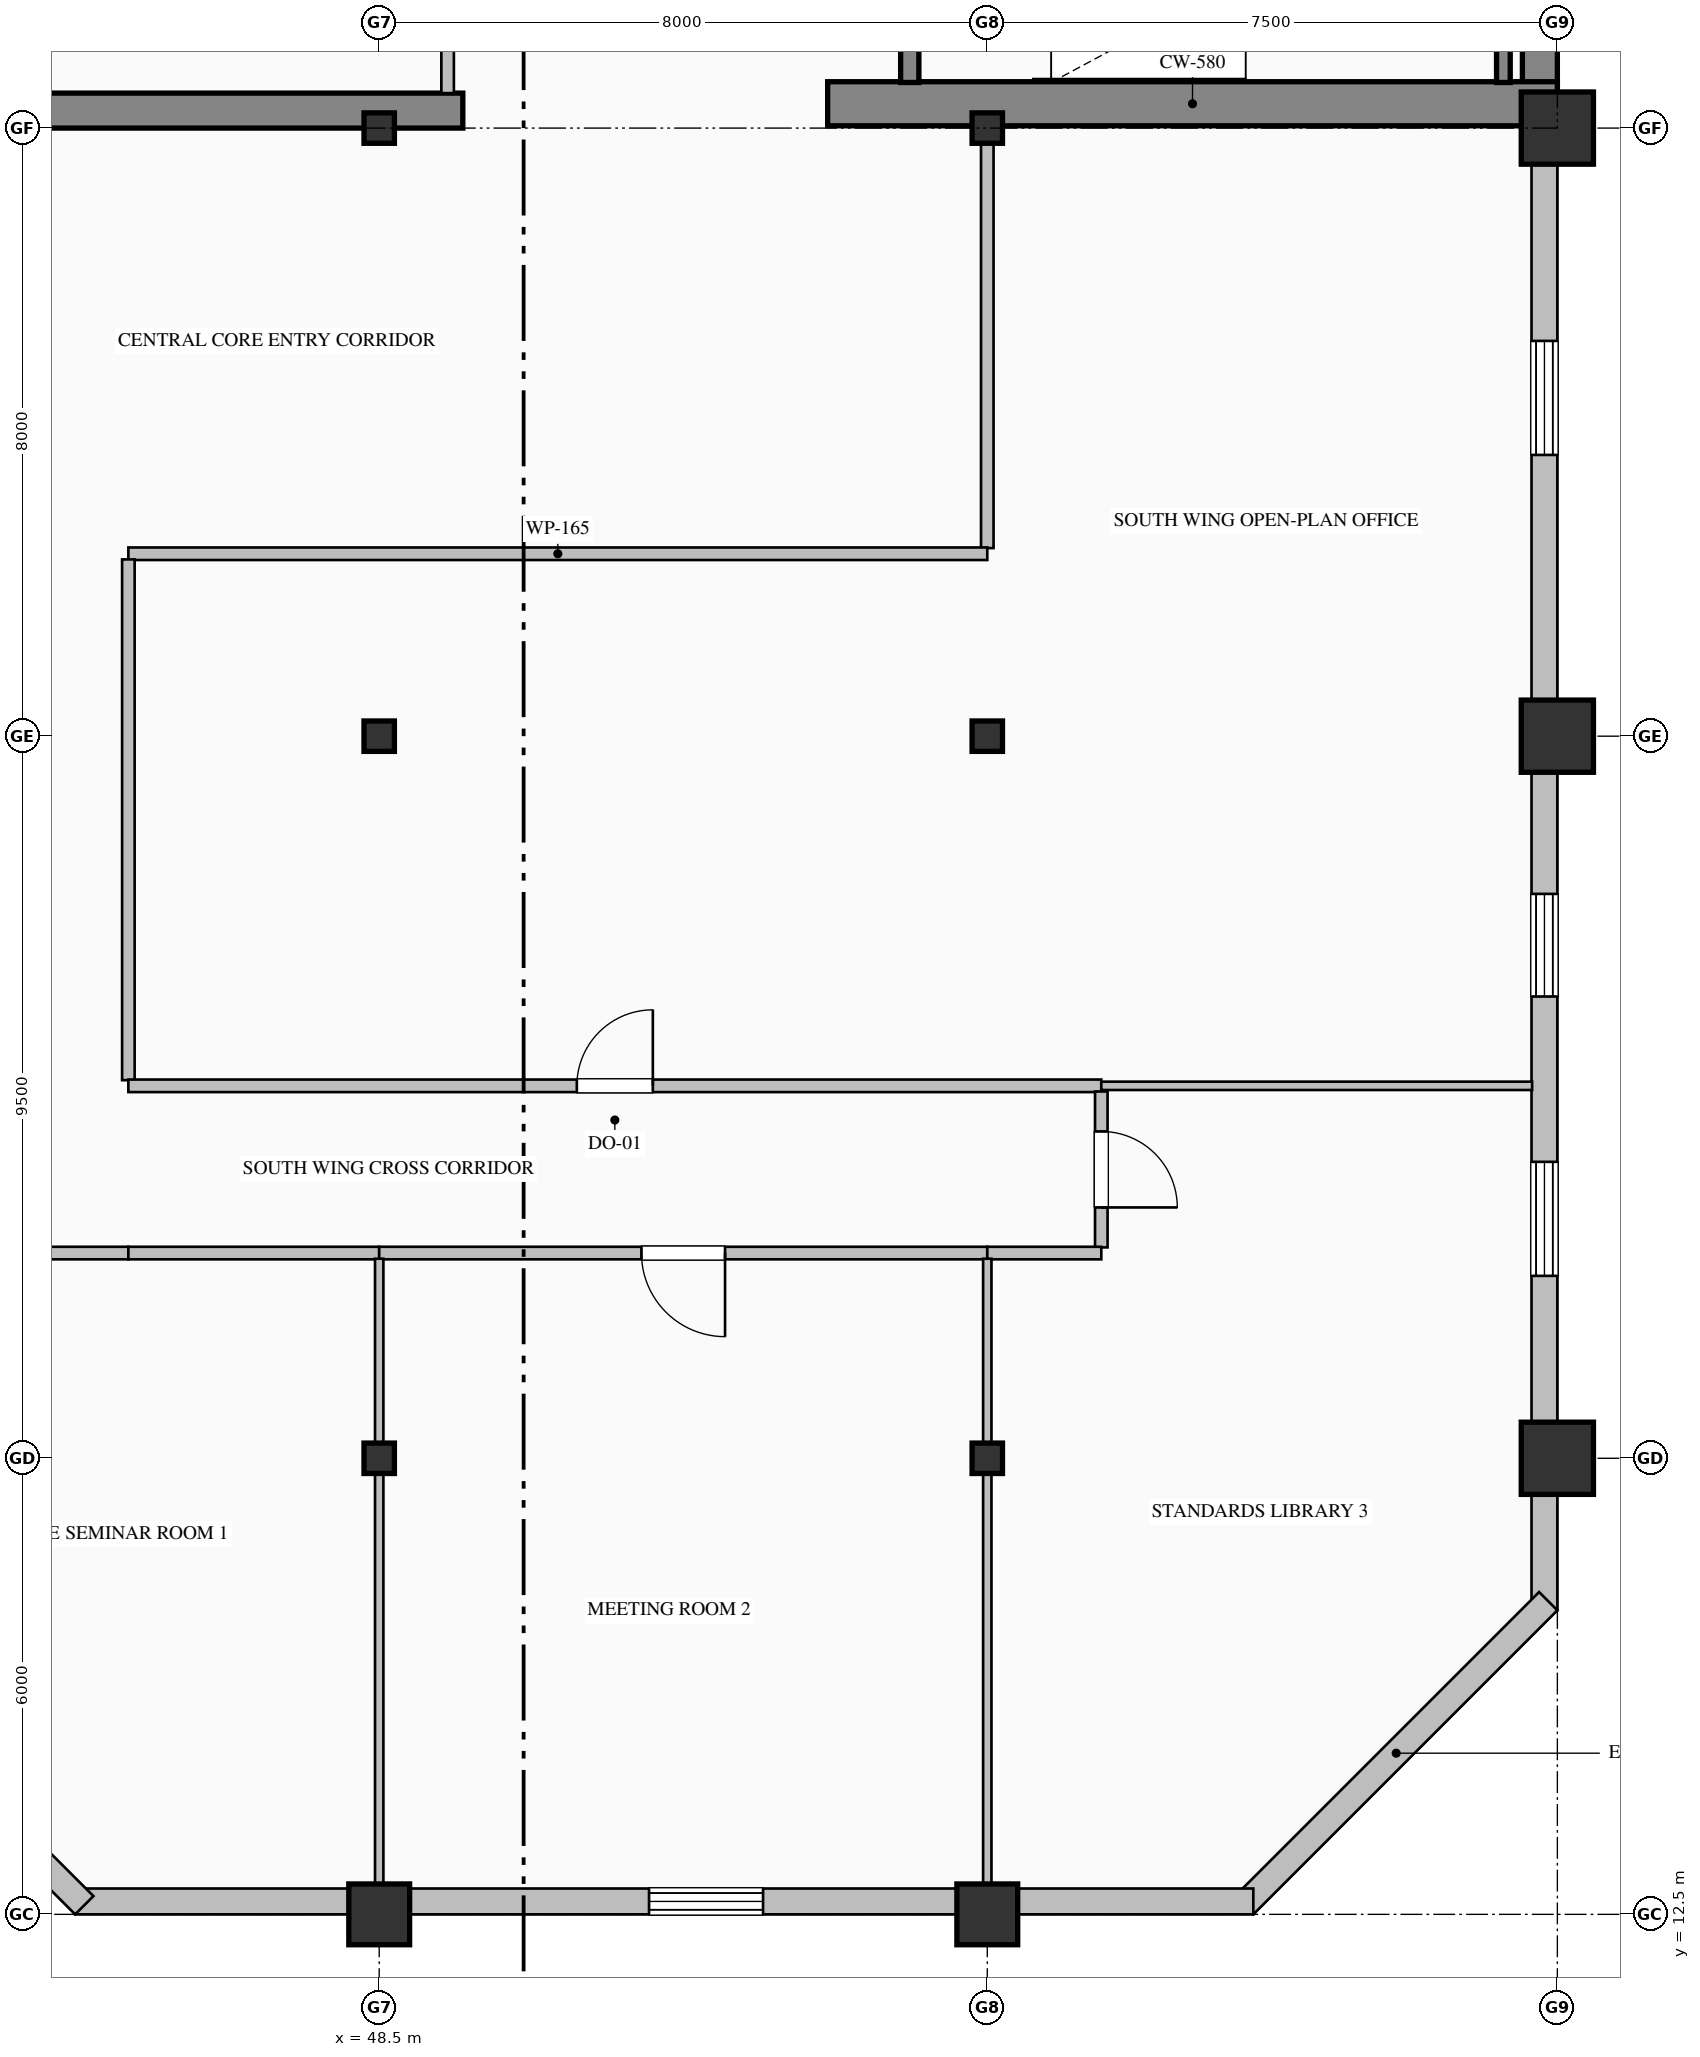
"""IFC4 building model, lengths in metres.
Left out: names, types, materials, properties, quantities, classifications, styles, units other than length and angle.
Written with IfcOpenShell. Run it as: python <this file> out.ifc"""

import sys

from ifc_helpers import new_model, si_unit, direction, frame, frame_2d, origin, origin_2d, place, context, subcontext, project, spatial, rectangle, hollow_rectangle, i_section, extrude, element, fill, save


model = new_model("IFC4")
c1 = context("Model", 3, precision=1e-05, world=origin(), true_north=direction((0.0, 1.0)))
c2 = subcontext(c1, "Body", "Model", "MODEL_VIEW")
j1 = project(units=[si_unit("LENGTHUNIT", "METRE"), si_unit("PLANEANGLEUNIT", "RADIAN")], contexts=[c1])
p1 = place(None, origin())
s1 = spatial("IfcSite", under=j1, at=p1, CompositionType="ELEMENT")
p2 = place(p1, origin())
s2 = spatial("IfcBuilding", under=s1, at=p2, CompositionType="ELEMENT")
p3 = place(p2, frame((0.0, 0.0, 221.8)))
s3 = spatial("IfcBuildingStorey", under=s2, at=p3, CompositionType="ELEMENT", Elevation=221.8)
p4 = place(p3, frame((63.77, 36.32, 0.0), z_axis=(0.0, 0.0, 1.0), x_axis=(0.0, 1.0, 0.0)))
e1 = element("IfcWall", 1, at=p4, inside=s3, PredefinedType="SHEAR", context=c2, shape_type="SweptSolid", body=[
    extrude(rectangle(XDim=15.22, YDim=0.46, at=frame_2d((7.61, 0.0))), origin(), (0.0, 0.0, 1.0), 3.775),
])
p5 = place(p3, frame((40.5, 36.23, 0.0), z_axis=(0.0, 0.0, 1.0), x_axis=(1.0, 0.0, 0.0)))
e2 = element("IfcWall", 2, at=p5, inside=s3, PredefinedType="SHEAR", context=c2, shape_type="SweptSolid", body=[
    extrude(rectangle(XDim=9.1, YDim=0.46, at=frame_2d((4.55, 0.0))), origin(), (0.0, 0.0, 1.0), 3.775),
])
p6 = place(p3, frame((54.4, 36.32, 0.0), z_axis=(0.0, 0.0, 1.0), x_axis=(1.0, 0.0, 0.0)))
e3 = element("IfcWall", 3, at=p6, inside=s3, PredefinedType="SHEAR", context=c2, shape_type="SweptSolid", body=[
    extrude(rectangle(XDim=9.6, YDim=0.58, at=frame_2d((4.8, 0.0))), origin(), (0.0, 0.0, 1.0), 4.0),
])
p7 = place(p3, frame((48.5, 12.5, 0.0), z_axis=(0.0, 0.0, 1.0), x_axis=(1.0, 0.0, 0.0)))
e4 = element("IfcColumn", 4, at=p7, inside=s3, PredefinedType="COLUMN", context=c2, shape_type="SweptSolid", body=[
    extrude(hollow_rectangle(XDim=0.8, YDim=0.8, WallThickness=0.032, at=origin_2d()), origin(), (0.0, 0.0, 1.0), 4.0),
])
for number, where, z_axis, x_axis in (
    (5, (48.5, 18.5, 0.0), (0.0, 0.0, 1.0), (1.0, 0.0, 0.0)),
    (6, (48.5, 28.0, 0.0), (0.0, 0.0, 1.0), (1.0, 0.0, 0.0)),
    (7, (48.5, 36.0, 0.0), (0.0, 0.0, 1.0), (1.0, 0.0, 0.0)),
):
    element("IfcColumn", number, at=place(p3, frame(where, z_axis=z_axis, x_axis=x_axis)), inside=s3, PredefinedType="COLUMN", context=c2, shape_type="SweptSolid", body=[
        extrude(i_section(OverallWidth=0.4, OverallDepth=0.4, WebThickness=0.013, FlangeThickness=0.021, FilletRadius=0.022, at=origin_2d()), origin(), (0.0, 0.0, 1.0), 4.0),
    ])
p8 = place(p3, frame((56.5, 12.5, 0.0), z_axis=(0.0, 0.0, 1.0), x_axis=(1.0, 0.0, 0.0)))
e8 = element("IfcColumn", 8, at=p8, inside=s3, PredefinedType="COLUMN", context=c2, shape_type="SweptSolid", body=[
    extrude(hollow_rectangle(XDim=0.8, YDim=0.8, WallThickness=0.032, at=origin_2d()), origin(), (0.0, 0.0, 1.0), 4.0),
])
for number, where, z_axis, x_axis in (
    (9, (56.5, 18.5, 0.0), (0.0, 0.0, 1.0), (1.0, 0.0, 0.0)),
    (10, (56.5, 28.0, 0.0), (0.0, 0.0, 1.0), (1.0, 0.0, 0.0)),
    (11, (56.5, 36.0, 0.0), (0.0, 0.0, 1.0), (1.0, 0.0, 0.0)),
):
    element("IfcColumn", number, at=place(p3, frame(where, z_axis=z_axis, x_axis=x_axis)), inside=s3, PredefinedType="COLUMN", context=c2, shape_type="SweptSolid", body=[
        extrude(i_section(OverallWidth=0.4, OverallDepth=0.4, WebThickness=0.013, FlangeThickness=0.021, FilletRadius=0.022, at=origin_2d()), origin(), (0.0, 0.0, 1.0), 4.0),
    ])
for number, where, z_axis, x_axis in (
    (12, (64.0, 18.5, 0.0), (0.0, 0.0, 1.0), (1.0, 0.0, 0.0)),
    (13, (64.0, 28.0, 0.0), (0.0, 0.0, 1.0), (1.0, 0.0, 0.0)),
    (14, (64.0, 36.0, 0.0), (0.0, 0.0, 1.0), (1.0, 0.0, 0.0)),
):
    element("IfcColumn", number, at=place(p3, frame(where, z_axis=z_axis, x_axis=x_axis)), inside=s3, PredefinedType="COLUMN", context=c2, shape_type="SweptSolid", body=[
        extrude(hollow_rectangle(XDim=0.95, YDim=0.95, WallThickness=0.036, at=origin_2d()), origin(), (0.0, 0.0, 1.0), 4.0),
    ])
p9 = place(p3, frame((63.83, 36.05, 0.0), z_axis=(0.0, 0.0, 1.0), x_axis=(0.0, -1.0, 0.0)))
e15 = element("IfcWall", 15, at=p9, inside=s3, PredefinedType="SOLIDWALL", context=c2, shape_type="SweptSolid", body=[
    extrude(rectangle(XDim=19.55, YDim=0.34, at=frame_2d((9.775, 0.0))), origin(), (0.0, 0.0, 1.0), 3.325),
])
p10 = place(p9, frame((2.85, 0.0, 0.7)))
e16 = element("IfcOpeningElement", 16, at=p10, cuts=e15, PredefinedType="OPENING", context=c2, shape_type="SweptSolid", body=[
    extrude(rectangle(XDim=1.5, YDim=2.4, at=frame_2d((0.75, 1.2))), frame((0.0, 0.18, 0.0), z_axis=(0.0, -1.0, 0.0), x_axis=(1.0, 0.0, 0.0)), (0.0, 0.0, 1.0), 0.36),
])
p11 = place(p9, frame((10.125, 0.0, 0.9)))
e17 = element("IfcOpeningElement", 17, at=p11, cuts=e15, PredefinedType="OPENING", context=c2, shape_type="SweptSolid", body=[
    extrude(rectangle(XDim=1.35, YDim=1.85, at=frame_2d((0.675, 0.925))), frame((0.0, 0.18, 0.0), z_axis=(0.0, -1.0, 0.0), x_axis=(1.0, 0.0, 0.0)), (0.0, 0.0, 1.0), 0.36),
])
p12 = place(p9, frame((13.65, 0.0, 0.7)))
e18 = element("IfcOpeningElement", 18, at=p12, cuts=e15, PredefinedType="OPENING", context=c2, shape_type="SweptSolid", body=[
    extrude(rectangle(XDim=1.5, YDim=2.4, at=frame_2d((0.75, 1.2))), frame((0.0, 0.18, 0.0), z_axis=(0.0, -1.0, 0.0), x_axis=(1.0, 0.0, 0.0)), (0.0, 0.0, 1.0), 0.36),
])
p13 = place(p3, frame((63.88, 16.62, 0.0), z_axis=(0.0, 0.0, 1.0), x_axis=(-0.707106781187, -0.707106781187, 0.0)))
e19 = element("IfcWall", 19, at=p13, inside=s3, PredefinedType="SOLIDWALL", context=c2, shape_type="SweptSolid", body=[
    extrude(rectangle(XDim=5.657, YDim=0.34, at=frame_2d((2.828, 0.0))), origin(), (0.0, 0.0, 1.0), 3.775),
])
p14 = place(p3, frame((60.0, 12.67, 0.0), z_axis=(0.0, 0.0, 1.0), x_axis=(-1.0, 0.0, 0.0)))
e20 = element("IfcWall", 20, at=p14, inside=s3, PredefinedType="SOLIDWALL", context=c2, shape_type="SweptSolid", body=[
    extrude(rectangle(XDim=15.5, YDim=0.34, at=frame_2d((7.75, 0.0))), origin(), (0.0, 0.0, 1.0), 3.325),
])
p15 = place(p14, frame((6.45, 0.0, 0.7)))
e21 = element("IfcOpeningElement", 21, at=p15, cuts=e20, PredefinedType="OPENING", context=c2, shape_type="SweptSolid", body=[
    extrude(rectangle(XDim=1.5, YDim=2.4, at=frame_2d((0.75, 1.2))), frame((0.0, 0.18, 0.0), z_axis=(0.0, -1.0, 0.0), x_axis=(1.0, 0.0, 0.0)), (0.0, 0.0, 1.0), 0.36),
])
p16 = place(p3, frame((44.62, 12.62, 0.0), z_axis=(0.0, 0.0, 1.0), x_axis=(-0.707106781187, 0.707106781187, 0.0)))
e22 = element("IfcWall", 22, at=p16, inside=s3, PredefinedType="SOLIDWALL", context=c2, shape_type="SweptSolid", body=[
    extrude(rectangle(XDim=5.657, YDim=0.34, at=frame_2d((2.828, 0.0))), origin(), (0.0, 0.0, 1.0), 3.775),
])
p17 = place(p3, frame((55.48, 39.75, 0.0), z_axis=(0.0, 0.0, 1.0), x_axis=(0.0, -1.0, 0.0)))
e23 = element("IfcWall", 23, at=p17, inside=s3, PredefinedType="SOLIDWALL", context=c2, shape_type="SweptSolid", body=[
    extrude(rectangle(XDim=3.15, YDim=0.24, at=frame_2d((1.575, 0.0))), origin(), (0.0, 0.0, 1.0), 4.0),
])
p18 = place(p17, frame((1.0, 0.0, 0.0)))
e24 = element("IfcOpeningElement", 24, at=p18, cuts=e23, PredefinedType="OPENING", context=c2, shape_type="SweptSolid", body=[
    extrude(rectangle(XDim=1.15, YDim=2.2, at=frame_2d((0.575, 1.1))), frame((0.0, 0.13, 0.0), z_axis=(0.0, -1.0, 0.0), x_axis=(1.0, 0.0, 0.0)), (0.0, 0.0, 1.0), 0.26),
])
p19 = place(p3, frame((63.29, 36.6, 0.0), z_axis=(0.0, 0.0, 1.0), x_axis=(0.0, 1.0, 0.0)))
e25 = element("IfcWall", 25, at=p19, inside=s3, PredefinedType="SOLIDWALL", context=c2, shape_type="SweptSolid", body=[
    extrude(rectangle(XDim=3.15, YDim=0.18, at=frame_2d((1.575, 0.0))), origin(), (0.0, 0.0, 1.0), 4.0),
])
p20 = place(p3, frame((49.4, 36.46, 0.0), z_axis=(0.0, 0.0, 1.0), x_axis=(0.0, 1.0, 0.0)))
e26 = element("IfcWall", 26, at=p20, inside=s3, PredefinedType="PARTITIONING", context=c2, shape_type="SweptSolid", body=[
    extrude(rectangle(XDim=3.093, YDim=0.165, at=frame_2d((1.546, 0.0))), origin(), (0.0, 0.0, 1.0), 3.017),
])
p21 = place(p20, frame((1.046, 0.0, 0.0)))
e27 = element("IfcOpeningElement", 27, at=p21, cuts=e26, PredefinedType="OPENING", context=c2, shape_type="SweptSolid", body=[
    extrude(rectangle(XDim=1.0, YDim=2.15, at=frame_2d((0.5, 1.075))), frame((0.0, 0.093, 0.0), z_axis=(0.0, -1.0, 0.0), x_axis=(1.0, 0.0, 0.0)), (0.0, 0.0, 1.0), 0.185),
])
p22 = place(p3, frame((56.5, 36.0, 0.0), z_axis=(0.0, 0.0, 1.0), x_axis=(0.0, -1.0, 0.0)))
e28 = element("IfcWall", 28, at=p22, inside=s3, PredefinedType="PARTITIONING", context=c2, shape_type="SweptSolid", body=[
    extrude(rectangle(XDim=5.525, YDim=0.165, at=frame_2d((2.763, 0.0))), origin(), (0.0, 0.0, 1.0), 3.179),
])
p23 = place(p3, frame((56.5, 30.4, 0.0), z_axis=(0.0, 0.0, 1.0), x_axis=(-1.0, 0.0, 0.0)))
e29 = element("IfcWall", 29, at=p23, inside=s3, PredefinedType="PARTITIONING", context=c2, shape_type="SweptSolid", body=[
    extrude(rectangle(XDim=11.3, YDim=0.165, at=frame_2d((5.65, 0.0))), origin(), (0.0, 0.0, 1.0), 3.775),
])
p24 = place(p3, frame((45.2, 30.325, 0.0), z_axis=(0.0, 0.0, 1.0), x_axis=(0.0, -1.0, 0.0)))
e30 = element("IfcWall", 30, at=p24, inside=s3, PredefinedType="PARTITIONING", context=c2, shape_type="SweptSolid", body=[
    extrude(rectangle(XDim=6.851, YDim=0.165, at=frame_2d((3.425, 0.0))), origin(), (0.0, 0.0, 1.0), 3.775),
])
p25 = place(p3, frame((45.2, 21.2, 0.0), z_axis=(0.0, 0.0, 1.0), x_axis=(-1.0, 0.0, 0.0)))
e31 = element("IfcWall", 31, at=p25, inside=s3, PredefinedType="PARTITIONING", context=c2, shape_type="SweptSolid", body=[
    extrude(rectangle(XDim=2.2, YDim=0.165, at=frame_2d((1.1, 0.0))), origin(), (0.0, 0.0, 1.0), 3.775),
])
p26 = place(p3, frame((45.2, 23.4, 0.0), z_axis=(0.0, 0.0, 1.0), x_axis=(1.0, 0.0, 0.0)))
e32 = element("IfcWall", 32, at=p26, inside=s3, PredefinedType="PARTITIONING", context=c2, shape_type="SweptSolid", body=[
    extrude(rectangle(XDim=12.8, YDim=0.165, at=frame_2d((6.4, 0.0))), origin(), (0.0, 0.0, 1.0), 3.467),
])
p27 = place(p26, frame((5.9, 0.0, 0.0)))
e33 = element("IfcOpeningElement", 33, at=p27, cuts=e32, PredefinedType="OPENING", context=c2, shape_type="SweptSolid", body=[
    extrude(rectangle(XDim=1.0, YDim=2.15, at=frame_2d((0.5, 1.075))), frame((0.0, 0.093, 0.0), z_axis=(0.0, -1.0, 0.0), x_axis=(1.0, 0.0, 0.0)), (0.0, 0.0, 1.0), 0.185),
])
p28 = place(p3, frame((48.5, 21.2, 0.0), z_axis=(0.0, 0.0, 1.0), x_axis=(-1.0, 0.0, 0.0)))
e34 = element("IfcWall", 34, at=p28, inside=s3, PredefinedType="PARTITIONING", context=c2, shape_type="SweptSolid", body=[
    extrude(rectangle(XDim=3.3, YDim=0.165, at=frame_2d((1.65, 0.0))), origin(), (0.0, 0.0, 1.0), 3.775),
])
p29 = place(p3, frame((56.5, 21.2, 0.0), z_axis=(0.0, 0.0, 1.0), x_axis=(-1.0, 0.0, 0.0)))
e35 = element("IfcWall", 35, at=p29, inside=s3, PredefinedType="PARTITIONING", context=c2, shape_type="SweptSolid", body=[
    extrude(rectangle(XDim=8.0, YDim=0.165, at=frame_2d((4.0, 0.0))), origin(), (0.0, 0.0, 1.0), 3.775),
])
p30 = place(p29, frame((3.45, 0.0, 0.0)))
e36 = element("IfcOpeningElement", 36, at=p30, cuts=e35, PredefinedType="OPENING", context=c2, shape_type="SweptSolid", body=[
    extrude(rectangle(XDim=1.1, YDim=2.2, at=frame_2d((0.55, 1.1))), frame((0.0, 0.093, 0.0), z_axis=(0.0, -1.0, 0.0), x_axis=(1.0, 0.0, 0.0)), (0.0, 0.0, 1.0), 0.185),
])
p31 = place(p3, frame((58.0, 23.325, 0.0), z_axis=(0.0, 0.0, 1.0), x_axis=(0.0, -1.0, 0.0)))
e37 = element("IfcWall", 37, at=p31, inside=s3, PredefinedType="PARTITIONING", context=c2, shape_type="SweptSolid", body=[
    extrude(rectangle(XDim=2.051, YDim=0.165, at=frame_2d((1.025, 0.0))), origin(), (0.0, 0.0, 1.0), 3.775),
])
p32 = place(p31, frame((0.525, 0.0, 0.0)))
e38 = element("IfcOpeningElement", 38, at=p32, cuts=e37, PredefinedType="OPENING", context=c2, shape_type="SweptSolid", body=[
    extrude(rectangle(XDim=1.0, YDim=2.15, at=frame_2d((0.5, 1.075))), frame((0.0, 0.093, 0.0), z_axis=(0.0, -1.0, 0.0), x_axis=(1.0, 0.0, 0.0)), (0.0, 0.0, 1.0), 0.185),
])
p33 = place(p3, frame((58.0, 21.2, 0.0), z_axis=(0.0, 0.0, 1.0), x_axis=(-1.0, 0.0, 0.0)))
e39 = element("IfcWall", 39, at=p33, inside=s3, PredefinedType="PARTITIONING", context=c2, shape_type="SweptSolid", body=[
    extrude(rectangle(XDim=1.5, YDim=0.165, at=frame_2d((0.75, 0.0))), origin(), (0.0, 0.0, 1.0), 3.775),
])
p34 = place(p3, frame((63.668, 23.4, 0.0), z_axis=(0.0, 0.0, 1.0), x_axis=(-1.0, 0.0, 0.0)))
e40 = element("IfcWall", 40, at=p34, inside=s3, PredefinedType="MOVABLE", context=c2, shape_type="SweptSolid", body=[
    extrude(rectangle(XDim=5.668, YDim=0.11, at=frame_2d((2.834, 0.0))), origin(), (0.0, 0.0, 1.0), 3.775),
])
for number, where, z_axis, x_axis in (
    (41, (48.5, 21.125, 0.0), (0.0, 0.0, 1.0), (0.0, -1.0, 0.0)),
    (42, (56.5, 21.125, 0.0), (0.0, 0.0, 1.0), (0.0, -1.0, 0.0)),
):
    element("IfcWall", number, at=place(p3, frame(where, z_axis=z_axis, x_axis=x_axis)), inside=s3, PredefinedType="MOVABLE", context=c2, shape_type="SweptSolid", body=[
        extrude(rectangle(XDim=8.293, YDim=0.11, at=frame_2d((4.147, 0.0))), origin(), (0.0, 0.0, 1.0), 2.967),
    ])
p35 = place(p10, origin())
e43 = element("IfcWindow", 43, at=p35, inside=s3, PartitioningType="DOUBLE_PANEL_HORIZONTAL", PredefinedType="WINDOW", context=c2, shape_type="SweptSolid", body=[
    extrude(rectangle(XDim=1.5, YDim=2.4, at=frame_2d((0.75, 1.2))), frame((0.0, 0.15, 0.0), z_axis=(0.0, -1.0, 0.0), x_axis=(1.0, 0.0, 0.0)), (0.0, 0.0, 1.0), 0.06),
])
fill(e16, e43)
p36 = place(p11, origin())
e44 = element("IfcWindow", 44, at=p36, inside=s3, PartitioningType="DOUBLE_PANEL_VERTICAL", PredefinedType="WINDOW", context=c2, shape_type="SweptSolid", body=[
    extrude(rectangle(XDim=1.35, YDim=1.85, at=frame_2d((0.675, 0.925))), frame((0.0, 0.15, 0.0), z_axis=(0.0, -1.0, 0.0), x_axis=(1.0, 0.0, 0.0)), (0.0, 0.0, 1.0), 0.06),
])
fill(e17, e44)
p37 = place(p12, origin())
e45 = element("IfcWindow", 45, at=p37, inside=s3, PartitioningType="DOUBLE_PANEL_HORIZONTAL", PredefinedType="WINDOW", context=c2, shape_type="SweptSolid", body=[
    extrude(rectangle(XDim=1.5, YDim=2.4, at=frame_2d((0.75, 1.2))), frame((0.0, 0.15, 0.0), z_axis=(0.0, -1.0, 0.0), x_axis=(1.0, 0.0, 0.0)), (0.0, 0.0, 1.0), 0.06),
])
fill(e18, e45)
p38 = place(p15, origin())
e46 = element("IfcWindow", 46, at=p38, inside=s3, PartitioningType="DOUBLE_PANEL_HORIZONTAL", PredefinedType="WINDOW", context=c2, shape_type="SweptSolid", body=[
    extrude(rectangle(XDim=1.5, YDim=2.4, at=frame_2d((0.75, 1.2))), frame((0.0, 0.15, 0.0), z_axis=(0.0, -1.0, 0.0), x_axis=(1.0, 0.0, 0.0)), (0.0, 0.0, 1.0), 0.06),
])
fill(e21, e46)
p39 = place(p27, origin())
e47 = element("IfcDoor", 47, at=p39, inside=s3, OperationType="SINGLE_SWING_RIGHT", PredefinedType="DOOR", context=c2, shape_type="SweptSolid", body=[
    extrude(rectangle(XDim=1.0, YDim=2.15, at=frame_2d((0.5, 1.075))), frame((0.0, 0.025, 0.0), z_axis=(0.0, -1.0, 0.0), x_axis=(1.0, 0.0, 0.0)), (0.0, 0.0, 1.0), 0.05),
])
fill(e33, e47)
p40 = place(p30, origin())
e48 = element("IfcDoor", 48, at=p40, inside=s3, OperationType="SINGLE_SWING_LEFT", PredefinedType="DOOR", context=c2, shape_type="SweptSolid", body=[
    extrude(rectangle(XDim=1.1, YDim=2.2, at=frame_2d((0.55, 1.1))), frame((0.0, 0.025, 0.0), z_axis=(0.0, -1.0, 0.0), x_axis=(1.0, 0.0, 0.0)), (0.0, 0.0, 1.0), 0.05),
])
fill(e36, e48)
p41 = place(p32, origin())
e49 = element("IfcDoor", 49, at=p41, inside=s3, OperationType="SINGLE_SWING_RIGHT", PredefinedType="DOOR", context=c2, shape_type="SweptSolid", body=[
    extrude(rectangle(XDim=1.0, YDim=2.15, at=frame_2d((0.5, 1.075))), frame((0.0, 0.025, 0.0), z_axis=(0.0, -1.0, 0.0), x_axis=(1.0, 0.0, 0.0)), (0.0, 0.0, 1.0), 0.05),
])
fill(e38, e49)
save(model, sys.argv[1])
